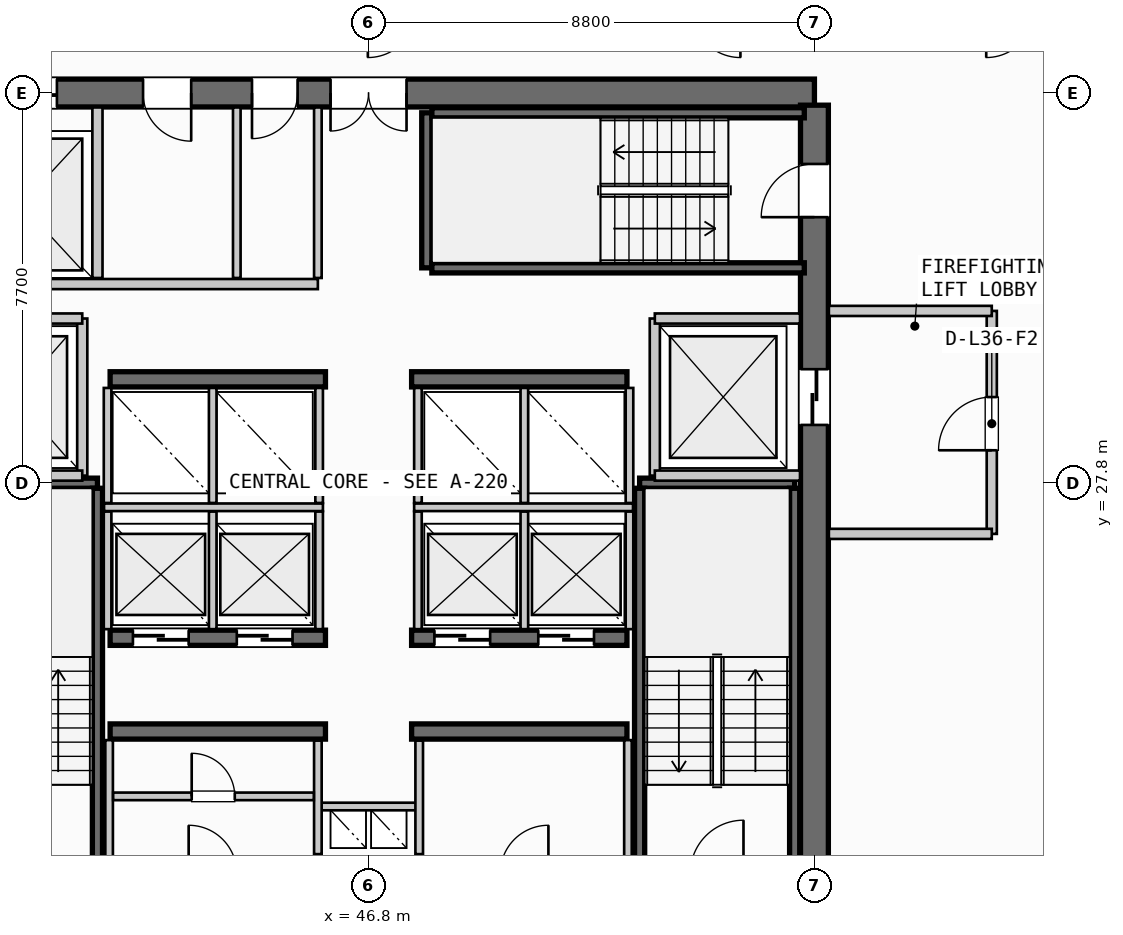
"""IFC4 building model, lengths in metres.
Left out: names, types, materials, properties, quantities, classifications, styles, units other than length and angle.
Written with IfcOpenShell. Run it as: python <this file> out.ifc"""

import sys

from ifc_helpers import new_model, si_unit, direction, frame, frame_2d, origin, place, context, subcontext, project, spatial, rectangle, extrude, source, transform, mapped, element, fill, save


model = new_model("IFC4")
c1 = context("Model", 3, precision=1e-05, world=origin(), true_north=direction((0.0, 1.0)))
c2 = subcontext(c1, "Body", "Model", "MODEL_VIEW")
j1 = project(units=[si_unit("LENGTHUNIT", "METRE"), si_unit("PLANEANGLEUNIT", "RADIAN")], contexts=[c1])
p1 = place(None, origin())
s1 = spatial("IfcSite", under=j1, at=p1, CompositionType="ELEMENT")
p2 = place(p1, origin())
s2 = spatial("IfcBuilding", under=s1, at=p2, CompositionType="ELEMENT")
p3 = place(p2, frame((0.0, 0.0, 143.0)))
s3 = spatial("IfcBuildingStorey", under=s2, at=p3, CompositionType="ELEMENT", Elevation=143.0)
p4 = place(p3, frame((55.6, 35.5, 0.0), z_axis=(0.0, 0.0, 1.0), x_axis=(-1.0, 0.0, 0.0)))
e1 = element("IfcWall", 1, at=p4, inside=s3, PredefinedType="SHEAR", context=c2, shape_type="SweptSolid", body=[
    extrude(rectangle(XDim=17.6, YDim=0.55, at=frame_2d((8.8, 0.0))), origin(), (0.0, 0.0, 1.0), 3.3),
])
p5 = place(p4, frame((8.05, 0.0, 0.0)))
e2 = element("IfcOpeningElement", 2, at=p5, cuts=e1, PredefinedType="OPENING", context=c2, shape_type="SweptSolid", body=[
    extrude(rectangle(XDim=1.5, YDim=2.2, at=frame_2d((0.75, 1.1))), frame((0.0, 0.285, 0.0), z_axis=(0.0, -1.0, 0.0), x_axis=(1.0, 0.0, 0.0)), (0.0, 0.0, 1.0), 0.57),
])
p6 = place(p4, frame((14.95, 0.0, 0.0)))
e3 = element("IfcOpeningElement", 3, at=p6, cuts=e1, PredefinedType="OPENING", context=c2, shape_type="SweptSolid", body=[
    extrude(rectangle(XDim=1.4, YDim=2.3, at=frame_2d((0.7, 1.15))), frame((0.0, 0.285, 0.0), z_axis=(0.0, -1.0, 0.0), x_axis=(1.0, 0.0, 0.0)), (0.0, 0.0, 1.0), 0.57),
])
p7 = place(p4, frame((12.3, 0.0, 0.0)))
e4 = element("IfcOpeningElement", 4, at=p7, cuts=e1, PredefinedType="OPENING", context=c2, shape_type="SweptSolid", body=[
    extrude(rectangle(XDim=0.95, YDim=2.15, at=frame_2d((0.475, 1.075))), frame((0.0, 0.285, 0.0), z_axis=(0.0, -1.0, 0.0), x_axis=(1.0, 0.0, 0.0)), (0.0, 0.0, 1.0), 0.57),
])
p8 = place(p4, frame((10.2, 0.0, 0.0)))
e5 = element("IfcOpeningElement", 5, at=p8, cuts=e1, PredefinedType="OPENING", context=c2, shape_type="SweptSolid", body=[
    extrude(rectangle(XDim=0.9, YDim=2.15, at=frame_2d((0.45, 1.075))), frame((0.0, 0.285, 0.0), z_axis=(0.0, -1.0, 0.0), x_axis=(1.0, 0.0, 0.0)), (0.0, 0.0, 1.0), 0.57),
])
p9 = place(p3, frame((55.6, 20.34, 0.0), z_axis=(0.0, 0.0, 1.0), x_axis=(0.0, 1.0, 0.0)))
e6 = element("IfcWall", 6, at=p9, inside=s3, PredefinedType="SHEAR", context=c2, shape_type="SweptSolid", body=[
    extrude(rectangle(XDim=14.92, YDim=0.55, at=frame_2d((7.46, 0.0))), origin(), (0.0, 0.0, 1.0), 3.3),
])
p10 = place(p9, frame((12.71, 0.0, 0.0)))
e7 = element("IfcOpeningElement", 7, at=p10, cuts=e6, PredefinedType="OPENING", context=c2, shape_type="SweptSolid", body=[
    extrude(rectangle(XDim=1.05, YDim=2.15, at=frame_2d((0.525, 1.075))), frame((0.0, 0.285, 0.0), z_axis=(0.0, -1.0, 0.0), x_axis=(1.0, 0.0, 0.0)), (0.0, 0.0, 1.0), 0.57),
])
p11 = place(p9, frame((8.61, 0.0, 0.0)))
e8 = element("IfcOpeningElement", 8, at=p11, cuts=e6, PredefinedType="OPENING", context=c2, shape_type="SweptSolid", body=[
    extrude(rectangle(XDim=1.1, YDim=2.2, at=frame_2d((0.55, 1.1))), frame((0.0, 0.285, 0.0), z_axis=(0.0, -1.0, 0.0), x_axis=(1.0, 0.0, 0.0)), (0.0, 0.0, 1.0), 0.57),
])
for number, where, z_axis, x_axis in (
    (9, (41.7, 22.9, 0.0), (0.0, 0.0, 1.0), (1.0, 0.0, 0.0)),
    (10, (47.65, 22.9, 0.0), (0.0, 0.0, 1.0), (1.0, 0.0, 0.0)),
):
    element("IfcWall", number, at=place(p3, frame(where, z_axis=z_axis, x_axis=x_axis)), inside=s3, PredefinedType="SHEAR", context=c2, shape_type="SweptSolid", body=[
        extrude(rectangle(XDim=4.25, YDim=0.3, at=frame_2d((2.125, 0.0))), origin(), (0.0, 0.0, 1.0), 3.3),
    ])
p12 = place(p3, frame((41.7, 24.75, 0.0), z_axis=(0.0, 0.0, 1.0), x_axis=(1.0, 0.0, 0.0)))
e11 = element("IfcWall", 11, at=p12, inside=s3, PredefinedType="SHEAR", context=c2, shape_type="SweptSolid", body=[
    extrude(rectangle(XDim=4.25, YDim=0.3, at=frame_2d((2.125, 0.0))), origin(), (0.0, 0.0, 1.0), 3.3),
])
p13 = place(p12, frame((0.45, 0.0, 0.0)))
e12 = element("IfcOpeningElement", 12, at=p13, cuts=e11, PredefinedType="OPENING", context=c2, shape_type="SweptSolid", body=[
    extrude(rectangle(XDim=1.1, YDim=2.2, at=frame_2d((0.55, 1.1))), frame((0.0, 0.16, 0.0), z_axis=(0.0, -1.0, 0.0), x_axis=(1.0, 0.0, 0.0)), (0.0, 0.0, 1.0), 0.32),
])
p14 = place(p12, frame((2.5, 0.0, 0.0)))
e13 = element("IfcOpeningElement", 13, at=p14, cuts=e11, PredefinedType="OPENING", context=c2, shape_type="SweptSolid", body=[
    extrude(rectangle(XDim=1.1, YDim=2.2, at=frame_2d((0.55, 1.1))), frame((0.0, 0.16, 0.0), z_axis=(0.0, -1.0, 0.0), x_axis=(1.0, 0.0, 0.0)), (0.0, 0.0, 1.0), 0.32),
])
p15 = place(p3, frame((47.65, 24.75, 0.0), z_axis=(0.0, 0.0, 1.0), x_axis=(1.0, 0.0, 0.0)))
e14 = element("IfcWall", 14, at=p15, inside=s3, PredefinedType="SHEAR", context=c2, shape_type="SweptSolid", body=[
    extrude(rectangle(XDim=4.25, YDim=0.3, at=frame_2d((2.125, 0.0))), origin(), (0.0, 0.0, 1.0), 3.3),
])
p16 = place(p15, frame((0.45, 0.0, 0.0)))
e15 = element("IfcOpeningElement", 15, at=p16, cuts=e14, PredefinedType="OPENING", context=c2, shape_type="SweptSolid", body=[
    extrude(rectangle(XDim=1.1, YDim=2.2, at=frame_2d((0.55, 1.1))), frame((0.0, 0.16, 0.0), z_axis=(0.0, -1.0, 0.0), x_axis=(1.0, 0.0, 0.0)), (0.0, 0.0, 1.0), 0.32),
])
p17 = place(p15, frame((2.5, 0.0, 0.0)))
e16 = element("IfcOpeningElement", 16, at=p17, cuts=e14, PredefinedType="OPENING", context=c2, shape_type="SweptSolid", body=[
    extrude(rectangle(XDim=1.1, YDim=2.2, at=frame_2d((0.55, 1.1))), frame((0.0, 0.16, 0.0), z_axis=(0.0, -1.0, 0.0), x_axis=(1.0, 0.0, 0.0)), (0.0, 0.0, 1.0), 0.32),
])
for number, where, z_axis, x_axis in (
    (17, (41.7, 29.85, 0.0), (0.0, 0.0, 1.0), (1.0, 0.0, 0.0)),
    (18, (47.65, 29.85, 0.0), (0.0, 0.0, 1.0), (1.0, 0.0, 0.0)),
):
    element("IfcWall", number, at=place(p3, frame(where, z_axis=z_axis, x_axis=x_axis)), inside=s3, PredefinedType="SHEAR", context=c2, shape_type="SweptSolid", body=[
        extrude(rectangle(XDim=4.25, YDim=0.3, at=frame_2d((2.125, 0.0))), origin(), (0.0, 0.0, 1.0), 3.3),
    ])
p18 = place(p3, frame((38.39, 27.8, 0.0), z_axis=(0.0, 0.0, 1.0), x_axis=(1.0, 0.0, 0.0)))
e19 = element("IfcWall", 19, at=p18, inside=s3, PredefinedType="SHEAR", context=c2, shape_type="SweptSolid", body=[
    extrude(rectangle(XDim=3.06, YDim=0.2, at=frame_2d((1.53, 0.0))), origin(), (0.0, 0.0, 1.0), 3.3),
])
p19 = place(p3, frame((41.45, 27.7, 0.0), z_axis=(0.0, 0.0, 1.0), x_axis=(0.0, -1.0, 0.0)))
e20 = element("IfcWall", 20, at=p19, inside=s3, PredefinedType="SHEAR", context=c2, shape_type="SweptSolid", body=[
    extrude(rectangle(XDim=7.35, YDim=0.2, at=frame_2d((3.675, 0.0))), origin(), (0.0, 0.0, 1.0), 3.3),
])
p20 = place(p3, frame((52.15, 27.8, 0.0), z_axis=(0.0, 0.0, 1.0), x_axis=(1.0, 0.0, 0.0)))
e21 = element("IfcWall", 21, at=p20, inside=s3, PredefinedType="SHEAR", context=c2, shape_type="SweptSolid", body=[
    extrude(rectangle(XDim=3.06, YDim=0.2, at=frame_2d((1.53, 0.0))), origin(), (0.0, 0.0, 1.0), 3.3),
])
for number, where, z_axis, x_axis in (
    (22, (55.21, 27.7, 0.0), (0.0, 0.0, 1.0), (0.0, -1.0, 0.0)),
    (23, (52.15, 20.35, 0.0), (0.0, 0.0, 1.0), (0.0, 1.0, 0.0)),
):
    element("IfcWall", number, at=place(p3, frame(where, z_axis=z_axis, x_axis=x_axis)), inside=s3, PredefinedType="SHEAR", context=c2, shape_type="SweptSolid", body=[
        extrude(rectangle(XDim=7.35, YDim=0.2, at=frame_2d((3.675, 0.0))), origin(), (0.0, 0.0, 1.0), 3.3),
    ])
p21 = place(p3, frame((47.95, 32.05, 0.0), z_axis=(0.0, 0.0, 1.0), x_axis=(0.0, 1.0, 0.0)))
e24 = element("IfcWall", 24, at=p21, inside=s3, PredefinedType="SHEAR", context=c2, shape_type="SweptSolid", body=[
    extrude(rectangle(XDim=3.06, YDim=0.2, at=frame_2d((1.53, 0.0))), origin(), (0.0, 0.0, 1.0), 3.3),
])
for number, where, z_axis, x_axis in (
    (25, (48.05, 35.11, 0.0), (0.0, 0.0, 1.0), (1.0, 0.0, 0.0)),
    (26, (55.4, 32.05, 0.0), (0.0, 0.0, 1.0), (-1.0, 0.0, 0.0)),
):
    element("IfcWall", number, at=place(p3, frame(where, z_axis=z_axis, x_axis=x_axis)), inside=s3, PredefinedType="SHEAR", context=c2, shape_type="SweptSolid", body=[
        extrude(rectangle(XDim=7.35, YDim=0.2, at=frame_2d((3.675, 0.0))), origin(), (0.0, 0.0, 1.0), 3.3),
    ])
p22 = place(p3, frame((45.8, 21.42, 0.0), z_axis=(0.0, 0.0, 1.0), x_axis=(1.0, 0.0, 0.0)))
e27 = element("IfcWall", 27, at=p22, inside=s3, PredefinedType="PARTITIONING", context=c2, shape_type="SweptSolid", body=[
    extrude(rectangle(XDim=2.0, YDim=0.15, at=frame_2d((1.0, 0.0))), origin(), (0.0, 0.0, 1.0), 2.305),
])
for number, where, z_axis, x_axis in (
    (28, (45.8, 20.48, 0.0), (0.0, 0.0, 1.0), (0.0, 1.0, 0.0)),
    (29, (47.8, 20.48, 0.0), (0.0, 0.0, 1.0), (0.0, 1.0, 0.0)),
):
    element("IfcWall", number, at=place(p3, frame(where, z_axis=z_axis, x_axis=x_axis)), inside=s3, PredefinedType="PARTITIONING", context=c2, shape_type="SweptSolid", body=[
        extrude(rectangle(XDim=2.24, YDim=0.15, at=frame_2d((1.12, 0.0))), origin(), (0.0, 0.0, 1.0), 2.305),
    ])
p23 = place(p3, frame((41.15, 27.95, 0.0), z_axis=(0.0, 0.0, 1.0), x_axis=(0.0, 1.0, 0.0)))
e30 = element("IfcWall", 30, at=p23, inside=s3, PredefinedType="PARTITIONING", context=c2, shape_type="SweptSolid", body=[
    extrude(rectangle(XDim=3.1, YDim=0.2, at=frame_2d((1.55, 0.0))), origin(), (0.0, 0.0, 1.0), 2.305),
])
for number, where, z_axis, x_axis in (
    (31, (38.285, 27.95, 0.0), (0.0, 0.0, 1.0), (1.0, 0.0, 0.0)),
    (32, (38.285, 31.05, 0.0), (0.0, 0.0, 1.0), (1.0, 0.0, 0.0)),
):
    element("IfcWall", number, at=place(p3, frame(where, z_axis=z_axis, x_axis=x_axis)), inside=s3, PredefinedType="PARTITIONING", context=c2, shape_type="SweptSolid", body=[
        extrude(rectangle(XDim=2.865, YDim=0.2, at=frame_2d((1.433, 0.0))), origin(), (0.0, 0.0, 1.0), 2.305),
    ])
p24 = place(p3, frame((52.45, 27.95, 0.0), z_axis=(0.0, 0.0, 1.0), x_axis=(0.0, 1.0, 0.0)))
e33 = element("IfcWall", 33, at=p24, inside=s3, PredefinedType="PARTITIONING", context=c2, shape_type="SweptSolid", body=[
    extrude(rectangle(XDim=3.1, YDim=0.2, at=frame_2d((1.55, 0.0))), origin(), (0.0, 0.0, 1.0), 2.305),
])
for number, where, z_axis, x_axis in (
    (34, (52.45, 27.95, 0.0), (0.0, 0.0, 1.0), (1.0, 0.0, 0.0)),
    (35, (52.45, 31.05, 0.0), (0.0, 0.0, 1.0), (1.0, 0.0, 0.0)),
):
    element("IfcWall", number, at=place(p3, frame(where, z_axis=z_axis, x_axis=x_axis)), inside=s3, PredefinedType="PARTITIONING", context=c2, shape_type="SweptSolid", body=[
        extrude(rectangle(XDim=2.865, YDim=0.2, at=frame_2d((1.433, 0.0))), origin(), (0.0, 0.0, 1.0), 2.305),
    ])
p25 = place(p3, frame((59.1, 26.8, 0.0), z_axis=(0.0, 0.0, 1.0), x_axis=(0.0, 1.0, 0.0)))
e36 = element("IfcWall", 36, at=p25, inside=s3, PredefinedType="PARTITIONING", context=c2, shape_type="SweptSolid", body=[
    extrude(rectangle(XDim=4.4, YDim=0.2, at=frame_2d((2.2, 0.0))), origin(), (0.0, 0.0, 1.0), 2.305),
])
p26 = place(p25, frame((1.65, 0.0, 0.0)))
e37 = element("IfcOpeningElement", 37, at=p26, cuts=e36, PredefinedType="OPENING", context=c2, shape_type="SweptSolid", body=[
    extrude(rectangle(XDim=1.05, YDim=2.15, at=frame_2d((0.525, 1.075))), frame((0.0, 0.11, 0.0), z_axis=(0.0, -1.0, 0.0), x_axis=(1.0, 0.0, 0.0)), (0.0, 0.0, 1.0), 0.22),
])
for number, where, z_axis, x_axis in (
    (38, (55.885, 26.8, 0.0), (0.0, 0.0, 1.0), (1.0, 0.0, 0.0)),
    (39, (55.885, 31.2, 0.0), (0.0, 0.0, 1.0), (1.0, 0.0, 0.0)),
):
    element("IfcWall", number, at=place(p3, frame(where, z_axis=z_axis, x_axis=x_axis)), inside=s3, PredefinedType="PARTITIONING", context=c2, shape_type="SweptSolid", body=[
        extrude(rectangle(XDim=3.215, YDim=0.2, at=frame_2d((1.607, 0.0))), origin(), (0.0, 0.0, 1.0), 2.305),
    ])
for number, where, z_axis, x_axis in (
    (40, (41.68, 20.385, 0.0), (0.0, 0.0, 1.0), (0.0, 1.0, 0.0)),
    (41, (51.92, 20.385, 0.0), (0.0, 0.0, 1.0), (0.0, 1.0, 0.0)),
):
    element("IfcWall", number, at=place(p3, frame(where, z_axis=z_axis, x_axis=x_axis)), inside=s3, PredefinedType="PARTITIONING", context=c2, shape_type="SweptSolid", body=[
        extrude(rectangle(XDim=2.345, YDim=0.15, at=frame_2d((1.172, 0.0))), origin(), (0.0, 0.0, 1.0), 2.305),
    ])
p27 = place(p3, frame((41.76, 21.62, 0.0), z_axis=(0.0, 0.0, 1.0), x_axis=(1.0, 0.0, 0.0)))
e42 = element("IfcWall", 42, at=p27, inside=s3, PredefinedType="PARTITIONING", context=c2, shape_type="SweptSolid", body=[
    extrude(rectangle(XDim=3.96, YDim=0.15, at=frame_2d((1.98, 0.0))), origin(), (0.0, 0.0, 1.0), 2.305),
])
p28 = place(p27, frame((1.55, 0.0, 0.0)))
e43 = element("IfcOpeningElement", 43, at=p28, cuts=e42, PredefinedType="OPENING", context=c2, shape_type="SweptSolid", body=[
    extrude(rectangle(XDim=0.85, YDim=2.15, at=frame_2d((0.425, 1.075))), frame((0.0, 0.085, 0.0), z_axis=(0.0, -1.0, 0.0), x_axis=(1.0, 0.0, 0.0)), (0.0, 0.0, 1.0), 0.17),
])
p29 = place(p3, frame((41.58, 27.325, 0.0), z_axis=(0.0, 0.0, 1.0), x_axis=(1.0, 0.0, 0.0)))
e44 = element("IfcWall", 44, at=p29, inside=s3, PredefinedType="PARTITIONING", context=c2, shape_type="SweptSolid", body=[
    extrude(rectangle(XDim=4.32, YDim=0.15, at=frame_2d((2.16, 0.0))), origin(), (0.0, 0.0, 1.0), 2.305),
])
p30 = place(p3, frame((47.7, 27.325, 0.0), z_axis=(0.0, 0.0, 1.0), x_axis=(1.0, 0.0, 0.0)))
e45 = element("IfcWall", 45, at=p30, inside=s3, PredefinedType="PARTITIONING", context=c2, shape_type="SweptSolid", body=[
    extrude(rectangle(XDim=4.32, YDim=0.15, at=frame_2d((2.16, 0.0))), origin(), (0.0, 0.0, 1.0), 2.305),
])
for number, where, z_axis, x_axis in (
    (46, (41.65, 24.92, 0.0), (0.0, 0.0, 1.0), (0.0, 1.0, 0.0)),
    (47, (43.725, 24.92, 0.0), (0.0, 0.0, 1.0), (0.0, 1.0, 0.0)),
    (48, (45.825, 24.92, 0.0), (0.0, 0.0, 1.0), (0.0, 1.0, 0.0)),
    (49, (47.775, 24.92, 0.0), (0.0, 0.0, 1.0), (0.0, 1.0, 0.0)),
    (50, (49.875, 24.92, 0.0), (0.0, 0.0, 1.0), (0.0, 1.0, 0.0)),
    (51, (51.95, 24.92, 0.0), (0.0, 0.0, 1.0), (0.0, 1.0, 0.0)),
):
    element("IfcWall", number, at=place(p3, frame(where, z_axis=z_axis, x_axis=x_axis)), inside=s3, PredefinedType="PARTITIONING", context=c2, shape_type="SweptSolid", body=[
        extrude(rectangle(XDim=2.32, YDim=0.15, at=frame_2d((1.16, 0.0))), origin(), (0.0, 0.0, 1.0), 2.305),
    ])
for number, where, z_axis, x_axis in (
    (52, (41.65, 27.41, 0.0), (0.0, 0.0, 1.0), (0.0, 1.0, 0.0)),
    (53, (43.725, 27.41, 0.0), (0.0, 0.0, 1.0), (0.0, 1.0, 0.0)),
    (54, (45.825, 27.41, 0.0), (0.0, 0.0, 1.0), (0.0, 1.0, 0.0)),
    (55, (47.775, 27.41, 0.0), (0.0, 0.0, 1.0), (0.0, 1.0, 0.0)),
    (56, (49.875, 27.41, 0.0), (0.0, 0.0, 1.0), (0.0, 1.0, 0.0)),
    (57, (51.95, 27.41, 0.0), (0.0, 0.0, 1.0), (0.0, 1.0, 0.0)),
):
    element("IfcWall", number, at=place(p3, frame(where, z_axis=z_axis, x_axis=x_axis)), inside=s3, PredefinedType="PARTITIONING", context=c2, shape_type="SweptSolid", body=[
        extrude(rectangle(XDim=2.27, YDim=0.15, at=frame_2d((1.135, 0.0))), origin(), (0.0, 0.0, 1.0), 2.305),
    ])
p31 = place(p3, frame((41.45, 31.85, 0.0), z_axis=(0.0, 0.0, 1.0), x_axis=(0.0, 1.0, 0.0)))
e58 = element("IfcWall", 58, at=p31, inside=s3, PredefinedType="PARTITIONING", context=c2, shape_type="SweptSolid", body=[
    extrude(rectangle(XDim=3.365, YDim=0.2, at=frame_2d((1.683, 0.0))), origin(), (0.0, 0.0, 1.0), 2.305),
])
p32 = place(p3, frame((38.285, 31.73, 0.0), z_axis=(0.0, 0.0, 1.0), x_axis=(1.0, 0.0, 0.0)))
e59 = element("IfcWall", 59, at=p32, inside=s3, PredefinedType="PARTITIONING", context=c2, shape_type="SweptSolid", body=[
    extrude(rectangle(XDim=7.515, YDim=0.2, at=frame_2d((3.758, 0.0))), origin(), (0.0, 0.0, 1.0), 2.305),
])
p33 = place(p3, frame((45.8, 31.85, 0.0), z_axis=(0.0, 0.0, 1.0), x_axis=(0.0, 1.0, 0.0)))
e60 = element("IfcWall", 60, at=p33, inside=s3, PredefinedType="PARTITIONING", context=c2, shape_type="SweptSolid", body=[
    extrude(rectangle(XDim=3.365, YDim=0.15, at=frame_2d((1.683, 0.0))), origin(), (0.0, 0.0, 1.0), 2.305),
])
p34 = place(p3, frame((44.2, 31.85, 0.0), z_axis=(0.0, 0.0, 1.0), x_axis=(0.0, 1.0, 0.0)))
e61 = element("IfcWall", 61, at=p34, inside=s3, PredefinedType="PLUMBINGWALL", context=c2, shape_type="SweptSolid", body=[
    extrude(rectangle(XDim=3.365, YDim=0.15, at=frame_2d((1.683, 0.0))), origin(), (0.0, 0.0, 1.0), 2.305),
])
m1 = source(origin(), c2, "Body", "SweptSolid", [
    extrude(rectangle(XDim=1.05, YDim=2.15, at=frame_2d((0.525, 1.075))), frame((0.0, 0.025, 0.0), z_axis=(0.0, -1.0, 0.0), x_axis=(1.0, 0.0, 0.0)), (0.0, 0.0, 1.0), 0.05),
])
p35 = place(p10, origin())
e62 = element("IfcDoor", 62, at=p35, inside=s3, OperationType="SINGLE_SWING_LEFT", PredefinedType="DOOR", context=c2, shape_type="MappedRepresentation", body=[
    mapped(m1, transform((0.0, 0.0, 0.0), scale=1.0)),
])
fill(e7, e62)
m2 = source(origin(), c2, "Body", "SweptSolid", [
    extrude(rectangle(XDim=1.5, YDim=2.2, at=frame_2d((0.75, 1.1))), frame((0.0, 0.025, 0.0), z_axis=(0.0, -1.0, 0.0), x_axis=(1.0, 0.0, 0.0)), (0.0, 0.0, 1.0), 0.05),
])
p36 = place(p5, origin())
e63 = element("IfcDoor", 63, at=p36, inside=s3, OperationType="DOUBLE_DOOR_SINGLE_SWING", PredefinedType="DOOR", context=c2, shape_type="MappedRepresentation", body=[
    mapped(m2, transform((0.0, 0.0, 0.0), scale=1.0)),
])
fill(e2, e63)
m3 = source(origin(), c2, "Body", "SweptSolid", [
    extrude(rectangle(XDim=1.1, YDim=2.2, at=frame_2d((0.55, 1.1))), frame((0.0, 0.025, 0.0), z_axis=(0.0, -1.0, 0.0), x_axis=(1.0, 0.0, 0.0)), (0.0, 0.0, 1.0), 0.05),
])
p37 = place(p11, origin())
e64 = element("IfcDoor", 64, at=p37, inside=s3, OperationType="SLIDING_TO_RIGHT", PredefinedType="DOOR", context=c2, shape_type="MappedRepresentation", body=[
    mapped(m3, transform((0.0, 0.0, 0.0), scale=1.0)),
])
fill(e8, e64)
p38 = place(p13, origin())
e65 = element("IfcDoor", 65, at=p38, inside=s3, OperationType="SLIDING_TO_RIGHT", PredefinedType="DOOR", context=c2, shape_type="MappedRepresentation", body=[
    mapped(m3, transform((0.0, 0.0, 0.0), scale=1.0)),
])
fill(e12, e65)
p39 = place(p14, origin())
e66 = element("IfcDoor", 66, at=p39, inside=s3, OperationType="SLIDING_TO_RIGHT", PredefinedType="DOOR", context=c2, shape_type="MappedRepresentation", body=[
    mapped(m3, transform((0.0, 0.0, 0.0), scale=1.0)),
])
fill(e13, e66)
p40 = place(p16, origin())
e67 = element("IfcDoor", 67, at=p40, inside=s3, OperationType="SLIDING_TO_RIGHT", PredefinedType="DOOR", context=c2, shape_type="MappedRepresentation", body=[
    mapped(m3, transform((0.0, 0.0, 0.0), scale=1.0)),
])
fill(e15, e67)
p41 = place(p17, origin())
e68 = element("IfcDoor", 68, at=p41, inside=s3, OperationType="SLIDING_TO_RIGHT", PredefinedType="DOOR", context=c2, shape_type="MappedRepresentation", body=[
    mapped(m3, transform((0.0, 0.0, 0.0), scale=1.0)),
])
fill(e16, e68)
m4 = source(origin(), c2, "Body", "SweptSolid", [
    extrude(rectangle(XDim=1.4, YDim=2.3, at=frame_2d((0.7, 1.15))), frame((0.0, 0.025, 0.0), z_axis=(0.0, -1.0, 0.0), x_axis=(1.0, 0.0, 0.0)), (0.0, 0.0, 1.0), 0.05),
])
p42 = place(p6, origin())
e69 = element("IfcDoor", 69, at=p42, inside=s3, OperationType="SLIDING_TO_RIGHT", PredefinedType="DOOR", context=c2, shape_type="MappedRepresentation", body=[
    mapped(m4, transform((0.0, 0.0, 0.0), scale=1.0)),
])
fill(e3, e69)
m5 = source(origin(), c2, "Body", "SweptSolid", [
    extrude(rectangle(XDim=0.95, YDim=2.15, at=frame_2d((0.475, 1.075))), frame((0.0, 0.025, 0.0), z_axis=(0.0, -1.0, 0.0), x_axis=(1.0, 0.0, 0.0)), (0.0, 0.0, 1.0), 0.05),
])
p43 = place(p7, origin())
e70 = element("IfcDoor", 70, at=p43, inside=s3, OperationType="SINGLE_SWING_LEFT", PredefinedType="DOOR", context=c2, shape_type="MappedRepresentation", body=[
    mapped(m5, transform((0.0, 0.0, 0.0), scale=1.0)),
])
fill(e4, e70)
m6 = source(origin(), c2, "Body", "SweptSolid", [
    extrude(rectangle(XDim=0.9, YDim=2.15, at=frame_2d((0.45, 1.075))), frame((0.0, 0.025, 0.0), z_axis=(0.0, -1.0, 0.0), x_axis=(1.0, 0.0, 0.0)), (0.0, 0.0, 1.0), 0.05),
])
p44 = place(p8, origin())
e71 = element("IfcDoor", 71, at=p44, inside=s3, OperationType="SINGLE_SWING_RIGHT", PredefinedType="DOOR", context=c2, shape_type="MappedRepresentation", body=[
    mapped(m6, transform((0.0, 0.0, 0.0), scale=1.0)),
])
fill(e5, e71)
p45 = place(p26, origin())
e72 = element("IfcDoor", 72, at=p45, inside=s3, OperationType="SINGLE_SWING_LEFT", PredefinedType="DOOR", context=c2, shape_type="MappedRepresentation", body=[
    mapped(m1, transform((0.0, 0.0, 0.0), scale=1.0)),
])
fill(e37, e72)
m7 = source(origin(), c2, "Body", "SweptSolid", [
    extrude(rectangle(XDim=0.85, YDim=2.15, at=frame_2d((0.425, 1.075))), frame((0.0, 0.025, 0.0), z_axis=(0.0, -1.0, 0.0), x_axis=(1.0, 0.0, 0.0)), (0.0, 0.0, 1.0), 0.05),
])
p46 = place(p28, origin())
e73 = element("IfcDoor", 73, at=p46, inside=s3, OperationType="SINGLE_SWING_LEFT", PredefinedType="DOOR", context=c2, shape_type="MappedRepresentation", body=[
    mapped(m7, transform((0.0, 0.0, 0.0), scale=1.0)),
])
fill(e43, e73)
save(model, sys.argv[1])
